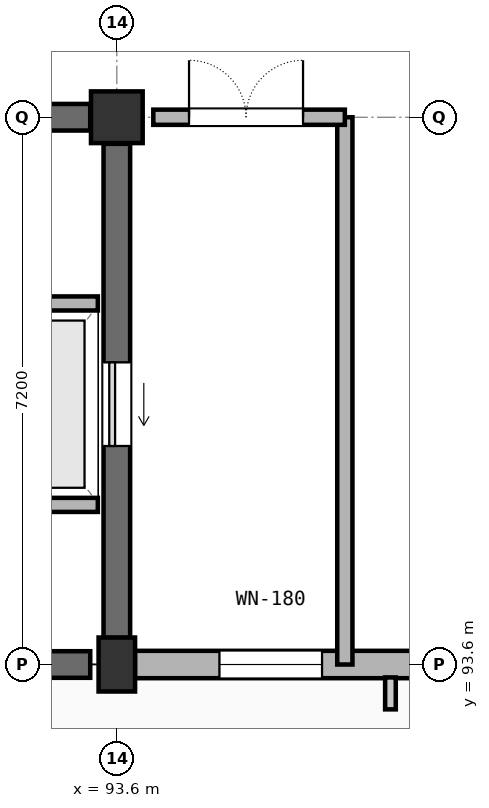
"""IFC4 building model, lengths in metres.
Left out: names, types, materials, properties, quantities, classifications, styles, units other than length and angle.
Written with IfcOpenShell. Run it as: python <this file> out.ifc"""

import sys

from ifc_helpers import new_model, si_unit, direction, frame, frame_2d, origin, origin_2d, place, context, subcontext, project, spatial, rectangle, extrude, element, fill, save


model = new_model("IFC4")
c1 = context("Model", 3, precision=1e-05, world=origin(), true_north=direction((0.0, 1.0)))
c2 = subcontext(c1, "Body", "Model", "MODEL_VIEW")
j1 = project(units=[si_unit("LENGTHUNIT", "METRE"), si_unit("PLANEANGLEUNIT", "RADIAN")], contexts=[c1])
p1 = place(None, origin())
s1 = spatial("IfcSite", under=j1, at=p1, CompositionType="ELEMENT")
p2 = place(p1, origin())
s2 = spatial("IfcBuilding", under=s1, at=p2, CompositionType="ELEMENT")
p3 = place(p2, frame((0.0, 0.0, 22.5)))
s3 = spatial("IfcBuildingStorey", under=s2, at=p3, CompositionType="ELEMENT", Elevation=22.5)
p4 = place(p3, frame((93.6, 93.6, 0.0), z_axis=(0.0, 0.0, 1.0), x_axis=(1.0, 0.0, 0.0)))
e1 = element("IfcColumn", 1, at=p4, inside=s3, PredefinedType="COLUMN", context=c2, shape_type="SweptSolid", body=[
    extrude(rectangle(XDim=0.48, YDim=0.71, at=origin_2d()), origin(), (0.0, 0.0, 1.0), 3.9),
])
p5 = place(p3, frame((93.6, 100.8, 0.0), z_axis=(0.0, 0.0, 1.0), x_axis=(1.0, 0.0, 0.0)))
e2 = element("IfcColumn", 2, at=p5, inside=s3, PredefinedType="COLUMN", context=c2, shape_type="SweptSolid", body=[
    extrude(rectangle(XDim=0.68, YDim=0.68, at=origin_2d()), origin(), (0.0, 0.0, 1.0), 3.9),
])
p6 = place(p3, frame((86.75, 93.6, 0.0), z_axis=(0.0, 0.0, 1.0), x_axis=(1.0, 0.0, 0.0)))
e3 = element("IfcWall", 3, at=p6, inside=s3, PredefinedType="SHEAR", context=c2, shape_type="SweptSolid", body=[
    extrude(rectangle(XDim=6.5, YDim=0.35, at=frame_2d((3.25, 0.0))), origin(), (0.0, 0.0, 1.0), 3.9),
])
p7 = place(p3, frame((93.6, 93.95, 0.0), z_axis=(0.0, 0.0, 1.0), x_axis=(0.0, 1.0, 0.0)))
e4 = element("IfcWall", 4, at=p7, inside=s3, PredefinedType="SHEAR", context=c2, shape_type="SweptSolid", body=[
    extrude(rectangle(XDim=6.5, YDim=0.35, at=frame_2d((3.25, 0.0))), origin(), (0.0, 0.0, 1.0), 3.9),
])
p8 = place(p7, frame((2.525, 0.0, 0.0)))
e5 = element("IfcOpeningElement", 5, at=p8, cuts=e4, PredefinedType="OPENING", context=c2, shape_type="SweptSolid", body=[
    extrude(rectangle(XDim=1.1, YDim=2.2, at=frame_2d((0.55, 1.1))), frame((0.0, 0.185, 0.0), z_axis=(0.0, -1.0, 0.0), x_axis=(1.0, 0.0, 0.0)), (0.0, 0.0, 1.0), 0.37),
])
p9 = place(p3, frame((93.25, 100.8, 0.0), z_axis=(0.0, 0.0, 1.0), x_axis=(-1.0, 0.0, 0.0)))
e6 = element("IfcWall", 6, at=p9, inside=s3, PredefinedType="SHEAR", context=c2, shape_type="SweptSolid", body=[
    extrude(rectangle(XDim=6.5, YDim=0.35, at=frame_2d((3.25, 0.0))), origin(), (0.0, 0.0, 1.0), 3.9),
])
p10 = place(p9, frame((3.6, 0.0, 0.0)))
e7 = element("IfcOpeningElement", 7, at=p10, cuts=e6, PredefinedType="OPENING", context=c2, shape_type="SweptSolid", body=[
    extrude(rectangle(XDim=1.2, YDim=2.2, at=frame_2d((0.6, 1.1))), frame((0.0, 0.185, 0.0), z_axis=(0.0, -1.0, 0.0), x_axis=(1.0, 0.0, 0.0)), (0.0, 0.0, 1.0), 0.37),
])
for number, where, z_axis, x_axis in (
    (8, (91.25, 95.7, 0.0), (0.0, 0.0, 1.0), (1.0, 0.0, 0.0)),
    (9, (91.25, 98.35, 0.0), (0.0, 0.0, 1.0), (1.0, 0.0, 0.0)),
):
    element("IfcWall", number, at=place(p3, frame(where, z_axis=z_axis, x_axis=x_axis)), inside=s3, PredefinedType="PARTITIONING", context=c2, shape_type="SweptSolid", body=[
        extrude(rectangle(XDim=2.1, YDim=0.185, at=frame_2d((1.05, 0.0))), origin(), (0.0, 0.0, 1.0), 3.9),
    ])
p11 = place(p3, frame((93.838, 93.6, 0.0), z_axis=(0.0, 0.0, 1.0), x_axis=(1.0, 0.0, 0.0)))
e10 = element("IfcWall", 10, at=p11, inside=s3, PredefinedType="SOLIDWALL", context=c2, shape_type="SweptSolid", body=[
    extrude(rectangle(XDim=6.724, YDim=0.36, at=frame_2d((3.362, 0.0))), origin(), (0.0, 0.0, 1.0), 2.74),
])
p12 = place(p11, frame((1.112, 0.0, 0.7)))
e11 = element("IfcOpeningElement", 11, at=p12, cuts=e10, PredefinedType="OPENING", context=c2, shape_type="SweptSolid", body=[
    extrude(rectangle(XDim=1.35, YDim=1.89, at=frame_2d((0.675, 0.945))), frame((0.0, 0.19, 0.0), z_axis=(0.0, -1.0, 0.0), x_axis=(1.0, 0.0, 0.0)), (0.0, 0.0, 1.0), 0.38),
])
p13 = place(p11, frame((4.312, 0.0, 0.7)))
e12 = element("IfcOpeningElement", 12, at=p13, cuts=e10, PredefinedType="OPENING", context=c2, shape_type="SweptSolid", body=[
    extrude(rectangle(XDim=1.05, YDim=1.89, at=frame_2d((0.525, 0.945))), frame((0.0, 0.19, 0.0), z_axis=(0.0, -1.0, 0.0), x_axis=(1.0, 0.0, 0.0)), (0.0, 0.0, 1.0), 0.38),
])
p14 = place(p3, frame((96.6, 93.6, 0.0), z_axis=(0.0, 0.0, 1.0), x_axis=(0.0, 1.0, 0.0)))
e13 = element("IfcWall", 13, at=p14, inside=s3, PredefinedType="PARTITIONING", context=c2, shape_type="SweptSolid", body=[
    extrude(rectangle(XDim=7.2, YDim=0.2, at=frame_2d((3.6, 0.0))), origin(), (0.0, 0.0, 1.0), 2.78),
])
p15 = place(p3, frame((96.6, 100.8, 0.0), z_axis=(0.0, 0.0, 1.0), x_axis=(-1.0, 0.0, 0.0)))
e14 = element("IfcWall", 14, at=p15, inside=s3, PredefinedType="PARTITIONING", context=c2, shape_type="SweptSolid", body=[
    extrude(rectangle(XDim=2.52, YDim=0.2, at=frame_2d((1.26, 0.0))), origin(), (0.0, 0.0, 1.0), 2.78),
])
p16 = place(p15, frame((0.55, 0.0, 0.0)))
e15 = element("IfcOpeningElement", 15, at=p16, cuts=e14, PredefinedType="OPENING", context=c2, shape_type="SweptSolid", body=[
    extrude(rectangle(XDim=1.5, YDim=2.2, at=frame_2d((0.75, 1.1))), frame((0.0, 0.11, 0.0), z_axis=(0.0, -1.0, 0.0), x_axis=(1.0, 0.0, 0.0)), (0.0, 0.0, 1.0), 0.22),
])
p17 = place(p8, origin())
e16 = element("IfcDoor", 16, at=p17, inside=s3, OperationType="SLIDING_TO_LEFT", PredefinedType="DOOR", context=c2, shape_type="SweptSolid", body=[
    extrude(rectangle(XDim=1.1, YDim=2.2, at=frame_2d((0.55, 1.1))), frame((0.0, 0.025, 0.0), z_axis=(0.0, -1.0, 0.0), x_axis=(1.0, 0.0, 0.0)), (0.0, 0.0, 1.0), 0.05),
])
fill(e5, e16)
p18 = place(p12, origin())
e17 = element("IfcWindow", 17, at=p18, inside=s3, PartitioningType="DOUBLE_PANEL_VERTICAL", PredefinedType="WINDOW", context=c2, shape_type="SweptSolid", body=[
    extrude(rectangle(XDim=1.35, YDim=1.89, at=frame_2d((0.675, 0.945))), frame((0.0, 0.03, 0.0), z_axis=(0.0, -1.0, 0.0), x_axis=(1.0, 0.0, 0.0)), (0.0, 0.0, 1.0), 0.06),
])
fill(e11, e17)
p19 = place(p16, frame((1.5, 0.0, 0.0), z_axis=(0.0, 0.0, 1.0), x_axis=(-1.0, 0.0, 0.0)))
e18 = element("IfcDoor", 18, at=p19, inside=s3, OperationType="DOUBLE_DOOR_SINGLE_SWING", PredefinedType="DOOR", context=c2, shape_type="SweptSolid", body=[
    extrude(rectangle(XDim=1.5, YDim=2.2, at=frame_2d((0.75, 1.1))), frame((0.0, 0.025, 0.0), z_axis=(0.0, -1.0, 0.0), x_axis=(1.0, 0.0, 0.0)), (0.0, 0.0, 1.0), 0.05),
])
fill(e15, e18)
save(model, sys.argv[1])
